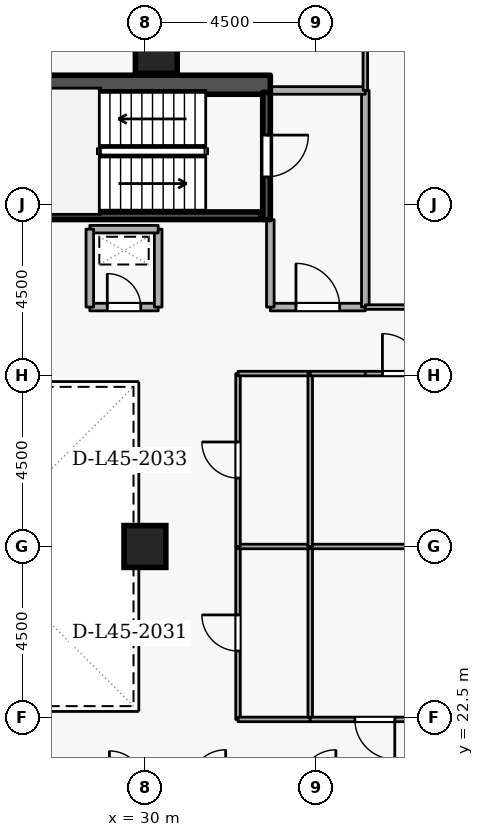
"""IFC4 building model, lengths in metres.
Left out: names, types, materials, properties, quantities, classifications, styles, units other than length and angle.
Written with IfcOpenShell. Run it as: python <this file> out.ifc"""

import sys

from ifc_helpers import new_model, si_unit, direction, frame, frame_2d, origin, origin_2d, place, context, subcontext, project, spatial, rectangle, extrude, element, fill, save


model = new_model("IFC4")
c1 = context("Model", 3, precision=1e-05, world=origin(), true_north=direction((0.0, 1.0)))
c2 = subcontext(c1, "Body", "Model", "MODEL_VIEW")
j1 = project(units=[si_unit("LENGTHUNIT", "METRE"), si_unit("PLANEANGLEUNIT", "RADIAN")], contexts=[c1])
p1 = place(None, origin())
s1 = spatial("IfcSite", under=j1, at=p1, CompositionType="ELEMENT")
p2 = place(p1, origin())
s2 = spatial("IfcBuilding", under=s1, at=p2, CompositionType="ELEMENT")
p3 = place(p2, frame((0.0, 0.0, 170.7)))
s3 = spatial("IfcBuildingStorey", under=s2, at=p3, CompositionType="ELEMENT", Elevation=170.7)
p4 = place(p3, frame((17.7, 39.15, 0.0), z_axis=(0.0, 0.0, 1.0), x_axis=(1.0, 0.0, 0.0)))
e1 = element("IfcWall", 1, at=p4, inside=s3, PredefinedType="SHEAR", context=c2, shape_type="SweptSolid", body=[
    extrude(rectangle(XDim=15.6, YDim=0.5, at=frame_2d((7.8, 0.0))), origin(), (0.0, 0.0, 1.0), 3.6),
])
for number, where, z_axis, x_axis in (
    (2, (30.3, 40.0, 0.0), (0.0, 0.0, 1.0), (1.0, 0.0, 0.0)),
    (3, (30.0, 27.0, 0.0), (0.0, 0.0, 1.0), (1.0, 0.0, 0.0)),
):
    element("IfcColumn", number, at=place(p3, frame(where, z_axis=z_axis, x_axis=x_axis)), inside=s3, PredefinedType="COLUMN", context=c2, shape_type="SweptSolid", body=[
        extrude(rectangle(XDim=1.1, YDim=1.1, at=origin_2d()), origin(), (0.0, 0.0, 1.0), 3.6),
    ])
p5 = place(p3, frame((33.2, 38.95, 0.0), z_axis=(0.0, 0.0, 1.0), x_axis=(0.0, -1.0, 0.0)))
e4 = element("IfcWall", 4, at=p5, inside=s3, PredefinedType="SHEAR", context=c2, shape_type="SweptSolid", body=[
    extrude(rectangle(XDim=3.35, YDim=0.2, at=frame_2d((1.675, 0.0))), origin(), (0.0, 0.0, 1.0), 3.6),
])
p6 = place(p5, frame((1.125, 0.0, 0.0)))
e5 = element("IfcOpeningElement", 5, at=p6, cuts=e4, PredefinedType="OPENING", context=c2, shape_type="SweptSolid", body=[
    extrude(rectangle(XDim=1.1, YDim=2.1, at=frame_2d((0.55, 1.05))), frame((0.0, 0.11, 0.0), z_axis=(0.0, -1.0, 0.0), x_axis=(1.0, 0.0, 0.0)), (0.0, 0.0, 1.0), 0.22),
])
p7 = place(p3, frame((25.95, 35.703, 0.0), z_axis=(0.0, 0.0, 1.0), x_axis=(1.0, 0.0, 0.0)))
e6 = element("IfcWall", 6, at=p7, inside=s3, PredefinedType="SHEAR", context=c2, shape_type="SweptSolid", body=[
    extrude(rectangle(XDim=7.1, YDim=0.2, at=frame_2d((3.55, 0.0))), origin(), (0.0, 0.0, 1.0), 3.6),
])
p8 = place(p3, frame((33.3, 33.3, 0.0), z_axis=(0.0, 0.0, 1.0), x_axis=(1.0, 0.0, 0.0)))
e7 = element("IfcWall", 7, at=p8, inside=s3, PredefinedType="STANDARD", context=c2, shape_type="SweptSolid", body=[
    extrude(rectangle(XDim=2.5, YDim=0.2, at=frame_2d((1.25, 0.0))), origin(), (0.0, 0.0, 1.0), 3.26),
])
p9 = place(p8, frame((0.675, 0.0, 0.0)))
e8 = element("IfcOpeningElement", 8, at=p9, cuts=e7, PredefinedType="OPENING", context=c2, shape_type="SweptSolid", body=[
    extrude(rectangle(XDim=1.15, YDim=2.1, at=frame_2d((0.575, 1.05))), frame((0.0, 0.11, 0.0), z_axis=(0.0, -1.0, 0.0), x_axis=(1.0, 0.0, 0.0)), (0.0, 0.0, 1.0), 0.22),
])
p10 = place(p3, frame((35.8, 33.3, 0.0), z_axis=(0.0, 0.0, 1.0), x_axis=(0.0, 1.0, 0.0)))
e9 = element("IfcWall", 9, at=p10, inside=s3, PredefinedType="STANDARD", context=c2, shape_type="SweptSolid", body=[
    extrude(rectangle(XDim=5.7, YDim=0.2, at=frame_2d((2.85, 0.0))), origin(), (0.0, 0.0, 1.0), 3.26),
])
p11 = place(p3, frame((35.8, 39.0, 0.0), z_axis=(0.0, 0.0, 1.0), x_axis=(-1.0, 0.0, 0.0)))
e10 = element("IfcWall", 10, at=p11, inside=s3, PredefinedType="STANDARD", context=c2, shape_type="SweptSolid", body=[
    extrude(rectangle(XDim=2.5, YDim=0.2, at=frame_2d((1.25, 0.0))), origin(), (0.0, 0.0, 1.0), 3.26),
])
p12 = place(p3, frame((33.3, 35.6, 0.0), z_axis=(0.0, 0.0, 1.0), x_axis=(0.0, -1.0, 0.0)))
e11 = element("IfcWall", 11, at=p12, inside=s3, PredefinedType="STANDARD", context=c2, shape_type="SweptSolid", body=[
    extrude(rectangle(XDim=2.3, YDim=0.2, at=frame_2d((1.15, 0.0))), origin(), (0.0, 0.0, 1.0), 2.465),
])
p13 = place(p3, frame((28.55, 33.3, 0.0), z_axis=(0.0, 0.0, 1.0), x_axis=(1.0, 0.0, 0.0)))
e12 = element("IfcWall", 12, at=p13, inside=s3, PredefinedType="STANDARD", context=c2, shape_type="SweptSolid", body=[
    extrude(rectangle(XDim=1.8, YDim=0.2, at=frame_2d((0.9, 0.0))), origin(), (0.0, 0.0, 1.0), 3.26),
])
p14 = place(p13, frame((0.46, 0.0, 0.0)))
e13 = element("IfcOpeningElement", 13, at=p14, cuts=e12, PredefinedType="OPENING", context=c2, shape_type="SweptSolid", body=[
    extrude(rectangle(XDim=0.88, YDim=2.04, at=frame_2d((0.44, 1.02))), frame((0.0, 0.11, 0.0), z_axis=(0.0, -1.0, 0.0), x_axis=(1.0, 0.0, 0.0)), (0.0, 0.0, 1.0), 0.22),
])
p15 = place(p3, frame((30.35, 33.3, 0.0), z_axis=(0.0, 0.0, 1.0), x_axis=(0.0, 1.0, 0.0)))
e14 = element("IfcWall", 14, at=p15, inside=s3, PredefinedType="STANDARD", context=c2, shape_type="SweptSolid", body=[
    extrude(rectangle(XDim=2.05, YDim=0.2, at=frame_2d((1.025, 0.0))), origin(), (0.0, 0.0, 1.0), 3.26),
])
p16 = place(p3, frame((30.35, 35.35, 0.0), z_axis=(0.0, 0.0, 1.0), x_axis=(-1.0, 0.0, 0.0)))
e15 = element("IfcWall", 15, at=p16, inside=s3, PredefinedType="STANDARD", context=c2, shape_type="SweptSolid", body=[
    extrude(rectangle(XDim=1.8, YDim=0.2, at=frame_2d((0.9, 0.0))), origin(), (0.0, 0.0, 1.0), 3.26),
])
p17 = place(p3, frame((28.55, 35.35, 0.0), z_axis=(0.0, 0.0, 1.0), x_axis=(0.0, -1.0, 0.0)))
e16 = element("IfcWall", 16, at=p17, inside=s3, PredefinedType="STANDARD", context=c2, shape_type="SweptSolid", body=[
    extrude(rectangle(XDim=2.05, YDim=0.2, at=frame_2d((1.025, 0.0))), origin(), (0.0, 0.0, 1.0), 3.26),
])
p18 = place(p3, frame((32.45, 22.45, 0.0), z_axis=(0.0, 0.0, 1.0), x_axis=(0.0, 1.0, 0.0)))
e17 = element("IfcWall", 17, at=p18, inside=s3, PredefinedType="PARTITIONING", context=c2, shape_type="SweptSolid", body=[
    extrude(rectangle(XDim=4.55, YDim=0.12, at=frame_2d((2.275, 0.0))), origin(), (0.0, 0.0, 1.0), 3.26),
])
p19 = place(p18, frame((1.8, 0.0, 0.0)))
e18 = element("IfcOpeningElement", 18, at=p19, cuts=e17, PredefinedType="OPENING", context=c2, shape_type="SweptSolid", body=[
    extrude(rectangle(XDim=0.95, YDim=2.1, at=frame_2d((0.475, 1.05))), frame((0.0, 0.07, 0.0), z_axis=(0.0, -1.0, 0.0), x_axis=(1.0, 0.0, 0.0)), (0.0, 0.0, 1.0), 0.14),
])
p20 = place(p3, frame((32.45, 27.0, 0.0), z_axis=(0.0, 0.0, 1.0), x_axis=(1.0, 0.0, 0.0)))
e19 = element("IfcWall", 19, at=p20, inside=s3, PredefinedType="PARTITIONING", context=c2, shape_type="SweptSolid", body=[
    extrude(rectangle(XDim=1.9, YDim=0.12, at=frame_2d((0.95, 0.0))), origin(), (0.0, 0.0, 1.0), 1.785),
])
p21 = place(p3, frame((34.35, 27.0, 0.0), z_axis=(0.0, 0.0, 1.0), x_axis=(0.0, -1.0, 0.0)))
e20 = element("IfcWall", 20, at=p21, inside=s3, PredefinedType="PARTITIONING", context=c2, shape_type="SweptSolid", body=[
    extrude(rectangle(XDim=4.55, YDim=0.12, at=frame_2d((2.275, 0.0))), origin(), (0.0, 0.0, 1.0), 3.26),
])
p22 = place(p3, frame((34.35, 22.45, 0.0), z_axis=(0.0, 0.0, 1.0), x_axis=(-1.0, 0.0, 0.0)))
e21 = element("IfcWall", 21, at=p22, inside=s3, PredefinedType="PARTITIONING", context=c2, shape_type="SweptSolid", body=[
    extrude(rectangle(XDim=1.9, YDim=0.12, at=frame_2d((0.95, 0.0))), origin(), (0.0, 0.0, 1.0), 3.26),
])
p23 = place(p3, frame((37.75, 22.45, 0.0), z_axis=(0.0, 0.0, 1.0), x_axis=(-1.0, 0.0, 0.0)))
e22 = element("IfcWall", 22, at=p23, inside=s3, PredefinedType="PARTITIONING", context=c2, shape_type="SweptSolid", body=[
    extrude(rectangle(XDim=3.4, YDim=0.12, at=frame_2d((1.7, 0.0))), origin(), (0.0, 0.0, 1.0), 3.26),
])
p24 = place(p23, frame((1.175, 0.0, 0.0)))
e23 = element("IfcOpeningElement", 23, at=p24, cuts=e22, PredefinedType="OPENING", context=c2, shape_type="SweptSolid", body=[
    extrude(rectangle(XDim=1.05, YDim=2.1, at=frame_2d((0.525, 1.05))), frame((0.0, 0.07, 0.0), z_axis=(0.0, -1.0, 0.0), x_axis=(1.0, 0.0, 0.0)), (0.0, 0.0, 1.0), 0.14),
])
p25 = place(p3, frame((34.35, 27.0, 0.0), z_axis=(0.0, 0.0, 1.0), x_axis=(1.0, 0.0, 0.0)))
e24 = element("IfcWall", 24, at=p25, inside=s3, PredefinedType="PARTITIONING", context=c2, shape_type="SweptSolid", body=[
    extrude(rectangle(XDim=10.692, YDim=0.12, at=frame_2d((5.346, 0.0))), origin(), (0.0, 0.0, 1.0), 1.785),
])
p26 = place(p3, frame((32.45, 27.0, 0.0), z_axis=(0.0, 0.0, 1.0), x_axis=(0.0, 1.0, 0.0)))
e25 = element("IfcWall", 25, at=p26, inside=s3, PredefinedType="PARTITIONING", context=c2, shape_type="SweptSolid", body=[
    extrude(rectangle(XDim=4.55, YDim=0.12, at=frame_2d((2.275, 0.0))), origin(), (0.0, 0.0, 1.0), 3.26),
])
p27 = place(p26, frame((1.8, 0.0, 0.0)))
e26 = element("IfcOpeningElement", 26, at=p27, cuts=e25, PredefinedType="OPENING", context=c2, shape_type="SweptSolid", body=[
    extrude(rectangle(XDim=0.95, YDim=2.1, at=frame_2d((0.475, 1.05))), frame((0.0, 0.07, 0.0), z_axis=(0.0, -1.0, 0.0), x_axis=(1.0, 0.0, 0.0)), (0.0, 0.0, 1.0), 0.14),
])
p28 = place(p3, frame((32.45, 31.55, 0.0), z_axis=(0.0, 0.0, 1.0), x_axis=(1.0, 0.0, 0.0)))
e27 = element("IfcWall", 27, at=p28, inside=s3, PredefinedType="PARTITIONING", context=c2, shape_type="SweptSolid", body=[
    extrude(rectangle(XDim=1.9, YDim=0.12, at=frame_2d((0.95, 0.0))), origin(), (0.0, 0.0, 1.0), 3.26),
])
p29 = place(p3, frame((34.35, 31.55, 0.0), z_axis=(0.0, 0.0, 1.0), x_axis=(0.0, -1.0, 0.0)))
e28 = element("IfcWall", 28, at=p29, inside=s3, PredefinedType="PARTITIONING", context=c2, shape_type="SweptSolid", body=[
    extrude(rectangle(XDim=4.55, YDim=0.12, at=frame_2d((2.275, 0.0))), origin(), (0.0, 0.0, 1.0), 3.26),
])
p30 = place(p3, frame((34.35, 31.55, 0.0), z_axis=(0.0, 0.0, 1.0), x_axis=(1.0, 0.0, 0.0)))
e29 = element("IfcWall", 29, at=p30, inside=s3, PredefinedType="PARTITIONING", context=c2, shape_type="SweptSolid", body=[
    extrude(rectangle(XDim=1.45, YDim=0.12, at=frame_2d((0.725, 0.0))), origin(), (0.0, 0.0, 1.0), 3.26),
])
p31 = place(p3, frame((35.8, 31.55, 0.0), z_axis=(0.0, 0.0, 1.0), x_axis=(1.0, 0.0, 0.0)))
e30 = element("IfcWall", 30, at=p31, inside=s3, PredefinedType="PARTITIONING", context=c2, shape_type="SweptSolid", body=[
    extrude(rectangle(XDim=1.95, YDim=0.12, at=frame_2d((0.975, 0.0))), origin(), (0.0, 0.0, 1.0), 3.26),
])
p32 = place(p31, frame((0.45, 0.0, 0.0)))
e31 = element("IfcOpeningElement", 31, at=p32, cuts=e30, PredefinedType="OPENING", context=c2, shape_type="SweptSolid", body=[
    extrude(rectangle(XDim=1.05, YDim=2.1, at=frame_2d((0.525, 1.05))), frame((0.0, 0.07, 0.0), z_axis=(0.0, -1.0, 0.0), x_axis=(1.0, 0.0, 0.0)), (0.0, 0.0, 1.0), 0.14),
])
p33 = place(p3, frame((37.75, 33.3, 0.0), z_axis=(0.0, 0.0, 1.0), x_axis=(-1.0, 0.0, 0.0)))
e32 = element("IfcWall", 32, at=p33, inside=s3, PredefinedType="PARTITIONING", context=c2, shape_type="SweptSolid", body=[
    extrude(rectangle(XDim=1.95, YDim=0.12, at=frame_2d((0.975, 0.0))), origin(), (0.0, 0.0, 1.0), 3.26),
])
p34 = place(p3, frame((35.8, 39.0, 0.0), z_axis=(0.0, 0.0, 1.0), x_axis=(0.0, 1.0, 0.0)))
e33 = element("IfcWall", 33, at=p34, inside=s3, PredefinedType="PARTITIONING", context=c2, shape_type="SweptSolid", body=[
    extrude(rectangle(XDim=5.72, YDim=0.12, at=frame_2d((2.86, 0.0))), origin(), (0.0, 0.0, 1.0), 3.26),
])
p35 = place(p6, origin())
e34 = element("IfcDoor", 34, at=p35, inside=s3, OperationType="SINGLE_SWING_LEFT", PredefinedType="DOOR", context=c2, shape_type="SweptSolid", body=[
    extrude(rectangle(XDim=1.1, YDim=2.1, at=frame_2d((0.55, 1.05))), frame((0.0, 0.025, 0.0), z_axis=(0.0, -1.0, 0.0), x_axis=(1.0, 0.0, 0.0)), (0.0, 0.0, 1.0), 0.05),
])
fill(e5, e34)
p36 = place(p9, origin())
e35 = element("IfcDoor", 35, at=p36, inside=s3, OperationType="SINGLE_SWING_LEFT", PredefinedType="DOOR", context=c2, shape_type="SweptSolid", body=[
    extrude(rectangle(XDim=1.15, YDim=2.1, at=frame_2d((0.575, 1.05))), frame((0.0, 0.025, 0.0), z_axis=(0.0, -1.0, 0.0), x_axis=(1.0, 0.0, 0.0)), (0.0, 0.0, 1.0), 0.05),
])
fill(e8, e35)
p37 = place(p14, origin())
e36 = element("IfcDoor", 36, at=p37, inside=s3, OperationType="SINGLE_SWING_LEFT", PredefinedType="DOOR", context=c2, shape_type="SweptSolid", body=[
    extrude(rectangle(XDim=0.88, YDim=2.04, at=frame_2d((0.44, 1.02))), frame((0.0, 0.025, 0.0), z_axis=(0.0, -1.0, 0.0), x_axis=(1.0, 0.0, 0.0)), (0.0, 0.0, 1.0), 0.05),
])
fill(e13, e36)
p38 = place(p19, origin())
e37 = element("IfcDoor", 37, at=p38, inside=s3, OperationType="SINGLE_SWING_RIGHT", PredefinedType="DOOR", context=c2, shape_type="SweptSolid", body=[
    extrude(rectangle(XDim=0.95, YDim=2.1, at=frame_2d((0.475, 1.05))), frame((0.0, 0.025, 0.0), z_axis=(0.0, -1.0, 0.0), x_axis=(1.0, 0.0, 0.0)), (0.0, 0.0, 1.0), 0.05),
])
fill(e18, e37)
p39 = place(p24, origin())
e38 = element("IfcDoor", 38, at=p39, inside=s3, OperationType="SINGLE_SWING_LEFT", PredefinedType="DOOR", context=c2, shape_type="SweptSolid", body=[
    extrude(rectangle(XDim=1.05, YDim=2.1, at=frame_2d((0.525, 1.05))), frame((0.0, 0.025, 0.0), z_axis=(0.0, -1.0, 0.0), x_axis=(1.0, 0.0, 0.0)), (0.0, 0.0, 1.0), 0.05),
])
fill(e23, e38)
p40 = place(p27, origin())
e39 = element("IfcDoor", 39, at=p40, inside=s3, OperationType="SINGLE_SWING_RIGHT", PredefinedType="DOOR", context=c2, shape_type="SweptSolid", body=[
    extrude(rectangle(XDim=0.95, YDim=2.1, at=frame_2d((0.475, 1.05))), frame((0.0, 0.025, 0.0), z_axis=(0.0, -1.0, 0.0), x_axis=(1.0, 0.0, 0.0)), (0.0, 0.0, 1.0), 0.05),
])
fill(e26, e39)
p41 = place(p32, origin())
e40 = element("IfcDoor", 40, at=p41, inside=s3, OperationType="SINGLE_SWING_LEFT", PredefinedType="DOOR", context=c2, shape_type="SweptSolid", body=[
    extrude(rectangle(XDim=1.05, YDim=2.1, at=frame_2d((0.525, 1.05))), frame((0.0, 0.025, 0.0), z_axis=(0.0, -1.0, 0.0), x_axis=(1.0, 0.0, 0.0)), (0.0, 0.0, 1.0), 0.05),
])
fill(e31, e40)
save(model, sys.argv[1])
